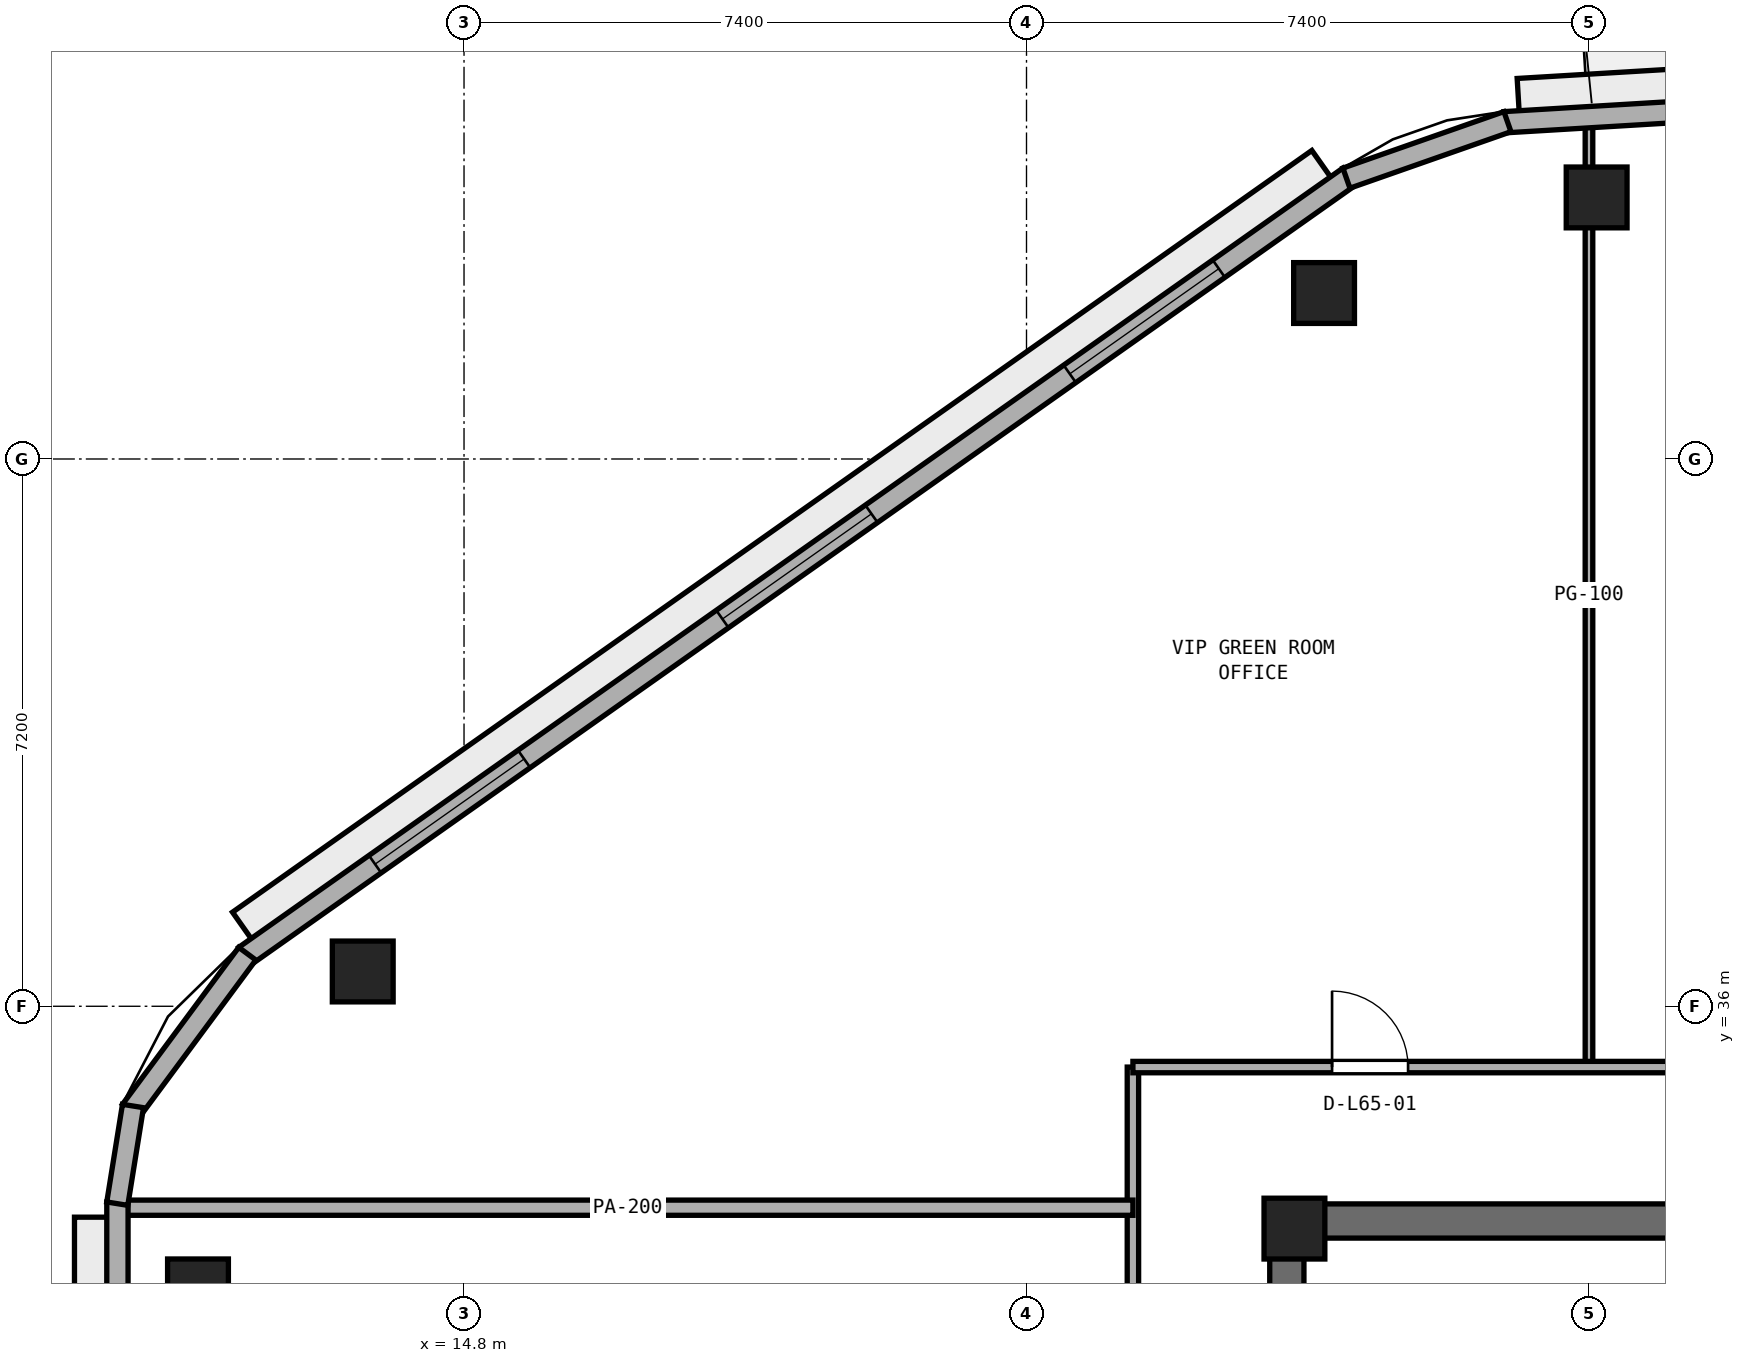
"""IFC4 building model, lengths in metres.
Left out: names, types, materials, properties, quantities, classifications, styles, units other than length and angle.
Written with IfcOpenShell. Run it as: python <this file> out.ifc"""

import sys

from ifc_helpers import new_model, si_unit, direction, frame, frame_2d, origin, origin_2d, place, context, subcontext, project, spatial, rectangle, extrude, element, fill, save


model = new_model("IFC4")
c1 = context("Model", 3, precision=1e-05, world=origin(), true_north=direction((0.0, 1.0)))
c2 = subcontext(c1, "Body", "Model", "MODEL_VIEW")
j1 = project(units=[si_unit("LENGTHUNIT", "METRE"), si_unit("PLANEANGLEUNIT", "RADIAN")], contexts=[c1])
p1 = place(None, origin())
s1 = spatial("IfcSite", under=j1, at=p1, CompositionType="ELEMENT")
p2 = place(p1, origin())
s2 = spatial("IfcBuilding", under=s1, at=p2, CompositionType="ELEMENT")
p3 = place(p2, frame((0.0, 0.0, 255.4)))
s3 = spatial("IfcBuildingStorey", under=s2, at=p3, CompositionType="ELEMENT", Elevation=255.4)
p4 = place(p3, frame((25.4, 33.175, 0.0), z_axis=(0.0, 0.0, 1.0), x_axis=(1.0, 0.0, 0.0)))
e1 = element("IfcWall", 1, at=p4, inside=s3, PredefinedType="SHEAR", context=c2, shape_type="SweptSolid", body=[
    extrude(rectangle(XDim=23.2, YDim=0.45, at=frame_2d((11.6, 0.0))), origin(), (0.0, 0.0, 1.0), 3.51),
])
p5 = place(p3, frame((25.625, 17.45, 0.0), z_axis=(0.0, 0.0, 1.0), x_axis=(0.0, 1.0, 0.0)))
e2 = element("IfcWall", 2, at=p5, inside=s3, PredefinedType="SHEAR", context=c2, shape_type="SweptSolid", body=[
    extrude(rectangle(XDim=15.5, YDim=0.45, at=frame_2d((7.75, 0.0))), origin(), (0.0, 0.0, 1.0), 3.51),
])
p6 = place(p5, frame((7.0, 0.0, 0.0)))
e3 = element("IfcOpeningElement", 3, at=p6, cuts=e2, PredefinedType="OPENING", context=c2, shape_type="SweptSolid", body=[
    extrude(rectangle(XDim=1.5, YDim=2.15, at=frame_2d((0.75, 1.075))), frame((0.0, 0.235, 0.0), z_axis=(0.0, -1.0, 0.0), x_axis=(1.0, 0.0, 0.0)), (0.0, 0.0, 1.0), 0.47),
])
p7 = place(p3, frame((25.725, 33.075, 0.0), z_axis=(0.0, 0.0, 1.0), x_axis=(1.0, 0.0, 0.0)))
e4 = element("IfcColumn", 4, at=p7, inside=s3, PredefinedType="PILASTER", context=c2, shape_type="SweptSolid", body=[
    extrude(rectangle(XDim=0.8, YDim=0.8, at=origin_2d()), origin(), (0.0, 0.0, 1.0), 3.8),
])
for number, where, z_axis, x_axis in (
    (5, (29.701, 46.641, 0.0), (0.0, 0.0, 1.0), (1.0, 0.0, 0.0)),
    (6, (26.115, 45.384, 0.0), (0.0, 0.0, 1.0), (1.0, 0.0, 0.0)),
    (7, (13.467, 36.458, 0.0), (0.0, 0.0, 1.0), (1.0, 0.0, 0.0)),
    (8, (11.3, 32.275, 0.0), (0.0, 0.0, 1.0), (1.0, 0.0, 0.0)),
):
    element("IfcColumn", number, at=place(p3, frame(where, z_axis=z_axis, x_axis=x_axis)), inside=s3, PredefinedType="COLUMN", context=c2, shape_type="SweptSolid", body=[
        extrude(rectangle(XDim=0.8, YDim=0.8, at=origin_2d()), origin(), (0.0, 0.0, 1.0), 3.8),
    ])
p8 = place(p3, frame((29.6, 35.2, 0.0), z_axis=(0.0, 0.0, 1.0), x_axis=(0.0, 1.0, 0.0)))
e9 = element("IfcWall", 9, at=p8, inside=s3, PredefinedType="PARTITIONING", context=c2, shape_type="SweptSolid", body=[
    extrude(rectangle(XDim=12.432, YDim=0.1, at=frame_2d((6.216, 0.0))), origin(), (0.0, 0.0, 1.0), 2.893),
])
p9 = place(p3, frame((23.6, 15.2, 0.0), z_axis=(0.0, 0.0, 1.0), x_axis=(0.0, 1.0, 0.0)))
e10 = element("IfcWall", 10, at=p9, inside=s3, PredefinedType="PARTITIONING", context=c2, shape_type="SweptSolid", body=[
    extrude(rectangle(XDim=20.0, YDim=0.15, at=frame_2d((10.0, 0.0))), origin(), (0.0, 0.0, 1.0), 3.51),
])
p10 = place(p9, frame((9.55, 0.0, 0.0)))
e11 = element("IfcOpeningElement", 11, at=p10, cuts=e10, PredefinedType="OPENING", context=c2, shape_type="SweptSolid", body=[
    extrude(rectangle(XDim=0.9, YDim=2.1, at=frame_2d((0.45, 1.05))), frame((0.0, 0.085, 0.0), z_axis=(0.0, -1.0, 0.0), x_axis=(1.0, 0.0, 0.0)), (0.0, 0.0, 1.0), 0.17),
])
p11 = place(p3, frame((10.305, 33.35, 0.0), z_axis=(0.0, 0.0, 1.0), x_axis=(1.0, 0.0, 0.0)))
e12 = element("IfcWall", 12, at=p11, inside=s3, PredefinedType="PARTITIONING", context=c2, shape_type="SweptSolid", body=[
    extrude(rectangle(XDim=13.295, YDim=0.2, at=frame_2d((6.647, 0.0))), origin(), (0.0, 0.0, 1.0), 3.51),
])
p12 = place(p3, frame((23.6, 35.2, 0.0), z_axis=(0.0, 0.0, 1.0), x_axis=(1.0, 0.0, 0.0)))
e13 = element("IfcWall", 13, at=p12, inside=s3, PredefinedType="PARTITIONING", context=c2, shape_type="SweptSolid", body=[
    extrude(rectangle(XDim=12.05, YDim=0.15, at=frame_2d((6.025, 0.0))), origin(), (0.0, 0.0, 1.0), 3.51),
])
p13 = place(p12, frame((2.62, 0.0, 0.0)))
e14 = element("IfcOpeningElement", 14, at=p13, cuts=e13, PredefinedType="OPENING", context=c2, shape_type="SweptSolid", body=[
    extrude(rectangle(XDim=1.0, YDim=2.12, at=frame_2d((0.5, 1.06))), frame((0.0, 0.085, 0.0), z_axis=(0.0, -1.0, 0.0), x_axis=(1.0, 0.0, 0.0)), (0.0, 0.0, 1.0), 0.17),
])
p14 = place(p3, frame((47.566, 48.775, 0.0), z_axis=(0.0, 0.0, 1.0), x_axis=(-0.998202767485, -0.059926913695, 0.0)))
e15 = element("IfcWall", 15, at=p14, inside=s3, PredefinedType="STANDARD", context=c2, shape_type="SweptSolid", body=[
    extrude(rectangle(XDim=19.111, YDim=0.28, at=frame_2d((9.556, 0.0))), origin(), (0.0, 0.0, 1.0), 3.51),
])
p15 = place(p14, frame((9.656, 0.0, 0.0)))
e16 = element("IfcOpeningElement", 16, at=p15, cuts=e15, PredefinedType="OPENING", context=c2, shape_type="SweptSolid", body=[
    extrude(rectangle(XDim=1.1, YDim=2.2, at=frame_2d((0.55, 1.1))), frame((0.0, 0.15, 0.0), z_axis=(0.0, -1.0, 0.0), x_axis=(1.0, 0.0, 0.0)), (0.0, 0.0, 1.0), 0.3),
])
p16 = place(p14, frame((2.319, 0.0, 0.9)))
e17 = element("IfcOpeningElement", 17, at=p16, cuts=e15, PredefinedType="OPENING", context=c2, shape_type="SweptSolid", body=[
    extrude(rectangle(XDim=2.4, YDim=1.75, at=frame_2d((1.2, 0.875))), frame((0.0, 0.15, 0.0), z_axis=(0.0, -1.0, 0.0), x_axis=(1.0, 0.0, 0.0)), (0.0, 0.0, 1.0), 0.3),
])
p17 = place(p14, frame((14.392, 0.0, 0.9)))
e18 = element("IfcOpeningElement", 18, at=p17, cuts=e15, PredefinedType="OPENING", context=c2, shape_type="SweptSolid", body=[
    extrude(rectangle(XDim=2.4, YDim=1.75, at=frame_2d((1.2, 0.875))), frame((0.0, 0.15, 0.0), z_axis=(0.0, -1.0, 0.0), x_axis=(1.0, 0.0, 0.0)), (0.0, 0.0, 1.0), 0.3),
])
p18 = place(p3, frame((26.443, 46.913, 0.0), z_axis=(0.0, 0.0, 1.0), x_axis=(-0.817024179766, -0.576603407619, 0.0)))
e19 = element("IfcWall", 19, at=p18, inside=s3, PredefinedType="STANDARD", context=c2, shape_type="SweptSolid", body=[
    extrude(rectangle(XDim=17.78, YDim=0.28, at=frame_2d((8.89, 0.0))), origin(), (0.0, 0.0, 1.0), 3.51),
])
p19 = place(p18, frame((2.097, 0.0, 0.9)))
e20 = element("IfcOpeningElement", 20, at=p19, cuts=e19, PredefinedType="OPENING", context=c2, shape_type="SweptSolid", body=[
    extrude(rectangle(XDim=2.4, YDim=1.75, at=frame_2d((1.2, 0.875))), frame((0.0, 0.15, 0.0), z_axis=(0.0, -1.0, 0.0), x_axis=(1.0, 0.0, 0.0)), (0.0, 0.0, 1.0), 0.3),
])
p20 = place(p18, frame((7.69, 0.0, 0.9)))
e21 = element("IfcOpeningElement", 21, at=p20, cuts=e19, PredefinedType="OPENING", context=c2, shape_type="SweptSolid", body=[
    extrude(rectangle(XDim=2.4, YDim=1.75, at=frame_2d((1.2, 0.875))), frame((0.0, 0.15, 0.0), z_axis=(0.0, -1.0, 0.0), x_axis=(1.0, 0.0, 0.0)), (0.0, 0.0, 1.0), 0.3),
])
p21 = place(p18, frame((13.283, 0.0, 0.9)))
e22 = element("IfcOpeningElement", 22, at=p21, cuts=e19, PredefinedType="OPENING", context=c2, shape_type="SweptSolid", body=[
    extrude(rectangle(XDim=2.4, YDim=1.75, at=frame_2d((1.2, 0.875))), frame((0.0, 0.15, 0.0), z_axis=(0.0, -1.0, 0.0), x_axis=(1.0, 0.0, 0.0)), (0.0, 0.0, 1.0), 0.3),
])
p22 = place(p3, frame((10.24, 33.425, 0.0), z_axis=(0.0, 0.0, 1.0), x_axis=(0.0, -1.0, 0.0)))
e23 = element("IfcWall", 23, at=p22, inside=s3, PredefinedType="STANDARD", context=c2, shape_type="SweptSolid", body=[
    extrude(rectangle(XDim=17.257, YDim=0.28, at=frame_2d((8.628, 0.0))), origin(), (0.0, 0.0, 1.0), 3.51),
])
p23 = place(p22, frame((8.078, 0.0, 0.0)))
e24 = element("IfcOpeningElement", 24, at=p23, cuts=e23, PredefinedType="OPENING", context=c2, shape_type="SweptSolid", body=[
    extrude(rectangle(XDim=1.1, YDim=2.2, at=frame_2d((0.55, 1.1))), frame((0.0, 0.15, 0.0), z_axis=(0.0, -1.0, 0.0), x_axis=(1.0, 0.0, 0.0)), (0.0, 0.0, 1.0), 0.3),
])
p24 = place(p22, frame((2.01, 0.0, 0.9)))
e25 = element("IfcOpeningElement", 25, at=p24, cuts=e23, PredefinedType="OPENING", context=c2, shape_type="SweptSolid", body=[
    extrude(rectangle(XDim=2.4, YDim=1.75, at=frame_2d((1.2, 0.875))), frame((0.0, 0.15, 0.0), z_axis=(0.0, -1.0, 0.0), x_axis=(1.0, 0.0, 0.0)), (0.0, 0.0, 1.0), 0.3),
])
p25 = place(p22, frame((12.847, 0.0, 0.9)))
e26 = element("IfcOpeningElement", 26, at=p25, cuts=e23, PredefinedType="OPENING", context=c2, shape_type="SweptSolid", body=[
    extrude(rectangle(XDim=2.4, YDim=1.75, at=frame_2d((1.2, 0.875))), frame((0.0, 0.15, 0.0), z_axis=(0.0, -1.0, 0.0), x_axis=(1.0, 0.0, 0.0)), (0.0, 0.0, 1.0), 0.3),
])
p26 = place(p3, frame((28.527, 47.638, 0.0), z_axis=(0.0, 0.0, 1.0), x_axis=(-0.943686979207, -0.330839667022, 0.0)))
e27 = element("IfcWall", 27, at=p26, inside=s3, PredefinedType="STANDARD", context=c2, shape_type="SweptSolid", body=[
    extrude(rectangle(XDim=2.245, YDim=0.28, at=frame_2d((1.123, 0.0))), origin(), (0.0, 0.0, 1.0), 3.51),
])
p27 = place(p3, frame((11.948, 36.692, 0.0), z_axis=(0.0, 0.0, 1.0), x_axis=(-0.595170751493, -0.803599263668, 0.0)))
e28 = element("IfcWall", 28, at=p27, inside=s3, PredefinedType="STANDARD", context=c2, shape_type="SweptSolid", body=[
    extrude(rectangle(XDim=2.57, YDim=0.28, at=frame_2d((1.285, 0.0))), origin(), (0.0, 0.0, 1.0), 3.51),
])
p28 = place(p3, frame((10.445, 34.688, 0.0), z_axis=(0.0, 0.0, 1.0), x_axis=(-0.158524605336, -0.987355027081, 0.0)))
e29 = element("IfcWall", 29, at=p28, inside=s3, PredefinedType="STANDARD", context=c2, shape_type="SweptSolid", body=[
    extrude(rectangle(XDim=1.301, YDim=0.28, at=frame_2d((0.651, 0.0))), origin(), (0.0, 0.0, 1.0), 3.51),
])
p29 = place(p13, origin())
e30 = element("IfcDoor", 30, at=p29, inside=s3, OperationType="SINGLE_SWING_LEFT", PredefinedType="DOOR", context=c2, shape_type="SweptSolid", body=[
    extrude(rectangle(XDim=1.0, YDim=2.12, at=frame_2d((0.5, 1.06))), frame((0.0, 0.025, 0.0), z_axis=(0.0, -1.0, 0.0), x_axis=(1.0, 0.0, 0.0)), (0.0, 0.0, 1.0), 0.05),
])
fill(e14, e30)
p30 = place(p19, origin())
e31 = element("IfcWindow", 31, at=p30, inside=s3, PartitioningType="SINGLE_PANEL", PredefinedType="WINDOW", context=c2, shape_type="SweptSolid", body=[
    extrude(rectangle(XDim=2.4, YDim=1.75, at=frame_2d((1.2, 0.875))), frame((0.0, 0.03, 0.0), z_axis=(0.0, -1.0, 0.0), x_axis=(1.0, 0.0, 0.0)), (0.0, 0.0, 1.0), 0.06),
])
fill(e20, e31)
p31 = place(p20, origin())
e32 = element("IfcWindow", 32, at=p31, inside=s3, PartitioningType="SINGLE_PANEL", PredefinedType="WINDOW", context=c2, shape_type="SweptSolid", body=[
    extrude(rectangle(XDim=2.4, YDim=1.75, at=frame_2d((1.2, 0.875))), frame((0.0, 0.03, 0.0), z_axis=(0.0, -1.0, 0.0), x_axis=(1.0, 0.0, 0.0)), (0.0, 0.0, 1.0), 0.06),
])
fill(e21, e32)
p32 = place(p21, origin())
e33 = element("IfcWindow", 33, at=p32, inside=s3, PartitioningType="SINGLE_PANEL", PredefinedType="WINDOW", context=c2, shape_type="SweptSolid", body=[
    extrude(rectangle(XDim=2.4, YDim=1.75, at=frame_2d((1.2, 0.875))), frame((0.0, 0.03, 0.0), z_axis=(0.0, -1.0, 0.0), x_axis=(1.0, 0.0, 0.0)), (0.0, 0.0, 1.0), 0.06),
])
fill(e22, e33)
save(model, sys.argv[1])
